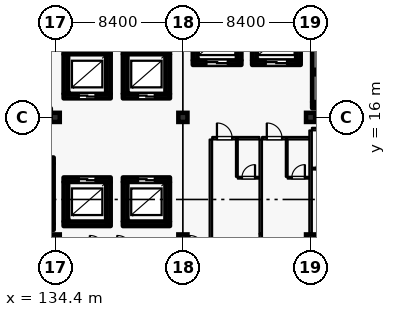
"""IFC4 building model, lengths in metres.
Left out: names, types, materials, properties, quantities, classifications, styles, units other than length and angle.
Written with IfcOpenShell. Run it as: python <this file> out.ifc"""

import sys

from ifc_helpers import new_model, si_unit, direction, frame, frame_2d, origin, origin_2d, place, context, subcontext, project, spatial, rectangle, hollow_rectangle, extrude, element, fill, save


model = new_model("IFC4")
c1 = context("Model", 3, precision=1e-05, world=origin(), true_north=direction((0.0, 1.0)))
c2 = subcontext(c1, "Body", "Model", "MODEL_VIEW")
j1 = project(units=[si_unit("LENGTHUNIT", "METRE"), si_unit("PLANEANGLEUNIT", "RADIAN")], contexts=[c1])
p1 = place(None, origin())
s1 = spatial("IfcSite", under=j1, at=p1, CompositionType="ELEMENT")
p2 = place(p1, origin())
s2 = spatial("IfcBuilding", under=s1, at=p2, CompositionType="ELEMENT")
p3 = place(p2, frame((0.0, 0.0, 39.6)))
s3 = spatial("IfcBuildingStorey", under=s2, at=p3, CompositionType="ELEMENT", Elevation=39.6)
for number, where, z_axis, x_axis in (
    (1, (134.4, 16.0, 0.0), (0.0, 0.0, 1.0), (1.0, 0.0, 0.0)),
    (2, (142.8, 16.0, 0.0), (0.0, 0.0, 1.0), (1.0, 0.0, 0.0)),
    (3, (151.2, 8.0, 0.0), (0.0, 0.0, 1.0), (1.0, 0.0, 0.0)),
    (4, (134.4, 8.0, 0.0), (0.0, 0.0, 1.0), (1.0, 0.0, 0.0)),
    (5, (142.8, 8.0, 0.0), (0.0, 0.0, 1.0), (1.0, 0.0, 0.0)),
    (6, (151.2, 16.0, 0.0), (0.0, 0.0, 1.0), (1.0, 0.0, 0.0)),
):
    element("IfcColumn", number, at=place(p3, frame(where, z_axis=z_axis, x_axis=x_axis)), inside=s3, PredefinedType="COLUMN", context=c2, shape_type="SweptSolid", body=[
        extrude(rectangle(XDim=0.6, YDim=0.6, at=origin_2d()), origin(), (0.0, 0.0, 1.0), 3.6),
    ])
p4 = place(p3, frame((134.95, 17.4, 0.0), z_axis=(0.0, 0.0, 1.0), x_axis=(1.0, 0.0, 0.0)))
e7 = element("IfcWall", 7, at=p4, inside=s3, PredefinedType="SHEAR", context=c2, shape_type="SweptSolid", body=[
    extrude(rectangle(XDim=3.1, YDim=0.3, at=frame_2d((1.55, 0.0))), origin(), (0.0, 0.0, 1.0), 3.335),
])
p5 = place(p4, frame((1.0, 0.0, 0.0)))
e8 = element("IfcOpeningElement", 8, at=p5, cuts=e7, PredefinedType="OPENING", context=c2, shape_type="SweptSolid", body=[
    extrude(rectangle(XDim=1.1, YDim=2.2, at=frame_2d((0.55, 1.1))), frame((0.0, 0.16, 0.0), z_axis=(0.0, -1.0, 0.0), x_axis=(1.0, 0.0, 0.0)), (0.0, 0.0, 1.0), 0.32),
])
p6 = place(p3, frame((137.9, 17.555, 0.0), z_axis=(0.0, 0.0, 1.0), x_axis=(0.0, 1.0, 0.0)))
e9 = element("IfcWall", 9, at=p6, inside=s3, PredefinedType="SHEAR", context=c2, shape_type="SweptSolid", body=[
    extrude(rectangle(XDim=2.59, YDim=0.3, at=frame_2d((1.295, 0.0))), origin(), (0.0, 0.0, 1.0), 3.335),
])
p7 = place(p3, frame((138.05, 20.3, 0.0), z_axis=(0.0, 0.0, 1.0), x_axis=(-1.0, 0.0, 0.0)))
e10 = element("IfcWall", 10, at=p7, inside=s3, PredefinedType="SHEAR", context=c2, shape_type="SweptSolid", body=[
    extrude(rectangle(XDim=3.1, YDim=0.3, at=frame_2d((1.55, 0.0))), origin(), (0.0, 0.0, 1.0), 3.335),
])
p8 = place(p3, frame((135.1, 20.145, 0.0), z_axis=(0.0, 0.0, 1.0), x_axis=(0.0, -1.0, 0.0)))
e11 = element("IfcWall", 11, at=p8, inside=s3, PredefinedType="SHEAR", context=c2, shape_type="SweptSolid", body=[
    extrude(rectangle(XDim=2.59, YDim=0.3, at=frame_2d((1.295, 0.0))), origin(), (0.0, 0.0, 1.0), 3.335),
])
p9 = place(p3, frame((138.85, 17.4, 0.0), z_axis=(0.0, 0.0, 1.0), x_axis=(1.0, 0.0, 0.0)))
e12 = element("IfcWall", 12, at=p9, inside=s3, PredefinedType="SHEAR", context=c2, shape_type="SweptSolid", body=[
    extrude(rectangle(XDim=3.1, YDim=0.3, at=frame_2d((1.55, 0.0))), origin(), (0.0, 0.0, 1.0), 3.335),
])
p10 = place(p9, frame((1.0, 0.0, 0.0)))
e13 = element("IfcOpeningElement", 13, at=p10, cuts=e12, PredefinedType="OPENING", context=c2, shape_type="SweptSolid", body=[
    extrude(rectangle(XDim=1.1, YDim=2.2, at=frame_2d((0.55, 1.1))), frame((0.0, 0.16, 0.0), z_axis=(0.0, -1.0, 0.0), x_axis=(1.0, 0.0, 0.0)), (0.0, 0.0, 1.0), 0.32),
])
p11 = place(p3, frame((141.8, 17.555, 0.0), z_axis=(0.0, 0.0, 1.0), x_axis=(0.0, 1.0, 0.0)))
e14 = element("IfcWall", 14, at=p11, inside=s3, PredefinedType="SHEAR", context=c2, shape_type="SweptSolid", body=[
    extrude(rectangle(XDim=2.59, YDim=0.3, at=frame_2d((1.295, 0.0))), origin(), (0.0, 0.0, 1.0), 3.335),
])
p12 = place(p3, frame((141.95, 20.3, 0.0), z_axis=(0.0, 0.0, 1.0), x_axis=(-1.0, 0.0, 0.0)))
e15 = element("IfcWall", 15, at=p12, inside=s3, PredefinedType="SHEAR", context=c2, shape_type="SweptSolid", body=[
    extrude(rectangle(XDim=3.1, YDim=0.3, at=frame_2d((1.55, 0.0))), origin(), (0.0, 0.0, 1.0), 3.335),
])
p13 = place(p3, frame((139.0, 20.145, 0.0), z_axis=(0.0, 0.0, 1.0), x_axis=(0.0, -1.0, 0.0)))
e16 = element("IfcWall", 16, at=p13, inside=s3, PredefinedType="SHEAR", context=c2, shape_type="SweptSolid", body=[
    extrude(rectangle(XDim=2.59, YDim=0.3, at=frame_2d((1.295, 0.0))), origin(), (0.0, 0.0, 1.0), 3.335),
])
p14 = place(p3, frame((134.95, 9.0, 0.0), z_axis=(0.0, 0.0, 1.0), x_axis=(1.0, 0.0, 0.0)))
e17 = element("IfcWall", 17, at=p14, inside=s3, PredefinedType="SHEAR", context=c2, shape_type="SweptSolid", body=[
    extrude(rectangle(XDim=3.1, YDim=0.3, at=frame_2d((1.55, 0.0))), origin(), (0.0, 0.0, 1.0), 3.335),
])
p15 = place(p3, frame((137.9, 9.155, 0.0), z_axis=(0.0, 0.0, 1.0), x_axis=(0.0, 1.0, 0.0)))
e18 = element("IfcWall", 18, at=p15, inside=s3, PredefinedType="SHEAR", context=c2, shape_type="SweptSolid", body=[
    extrude(rectangle(XDim=2.59, YDim=0.3, at=frame_2d((1.295, 0.0))), origin(), (0.0, 0.0, 1.0), 3.335),
])
p16 = place(p3, frame((138.05, 11.9, 0.0), z_axis=(0.0, 0.0, 1.0), x_axis=(-1.0, 0.0, 0.0)))
e19 = element("IfcWall", 19, at=p16, inside=s3, PredefinedType="SHEAR", context=c2, shape_type="SweptSolid", body=[
    extrude(rectangle(XDim=3.1, YDim=0.3, at=frame_2d((1.55, 0.0))), origin(), (0.0, 0.0, 1.0), 3.335),
])
p17 = place(p16, frame((1.0, 0.0, 0.0)))
e20 = element("IfcOpeningElement", 20, at=p17, cuts=e19, PredefinedType="OPENING", context=c2, shape_type="SweptSolid", body=[
    extrude(rectangle(XDim=1.1, YDim=2.2, at=frame_2d((0.55, 1.1))), frame((0.0, 0.16, 0.0), z_axis=(0.0, -1.0, 0.0), x_axis=(1.0, 0.0, 0.0)), (0.0, 0.0, 1.0), 0.32),
])
p18 = place(p3, frame((135.1, 11.745, 0.0), z_axis=(0.0, 0.0, 1.0), x_axis=(0.0, -1.0, 0.0)))
e21 = element("IfcWall", 21, at=p18, inside=s3, PredefinedType="SHEAR", context=c2, shape_type="SweptSolid", body=[
    extrude(rectangle(XDim=2.59, YDim=0.3, at=frame_2d((1.295, 0.0))), origin(), (0.0, 0.0, 1.0), 3.335),
])
p19 = place(p3, frame((138.85, 9.0, 0.0), z_axis=(0.0, 0.0, 1.0), x_axis=(1.0, 0.0, 0.0)))
e22 = element("IfcWall", 22, at=p19, inside=s3, PredefinedType="SHEAR", context=c2, shape_type="SweptSolid", body=[
    extrude(rectangle(XDim=3.1, YDim=0.3, at=frame_2d((1.55, 0.0))), origin(), (0.0, 0.0, 1.0), 3.335),
])
p20 = place(p3, frame((141.8, 9.155, 0.0), z_axis=(0.0, 0.0, 1.0), x_axis=(0.0, 1.0, 0.0)))
e23 = element("IfcWall", 23, at=p20, inside=s3, PredefinedType="SHEAR", context=c2, shape_type="SweptSolid", body=[
    extrude(rectangle(XDim=2.59, YDim=0.3, at=frame_2d((1.295, 0.0))), origin(), (0.0, 0.0, 1.0), 3.335),
])
p21 = place(p3, frame((141.95, 11.9, 0.0), z_axis=(0.0, 0.0, 1.0), x_axis=(-1.0, 0.0, 0.0)))
e24 = element("IfcWall", 24, at=p21, inside=s3, PredefinedType="SHEAR", context=c2, shape_type="SweptSolid", body=[
    extrude(rectangle(XDim=3.1, YDim=0.3, at=frame_2d((1.55, 0.0))), origin(), (0.0, 0.0, 1.0), 3.335),
])
p22 = place(p21, frame((1.0, 0.0, 0.0)))
e25 = element("IfcOpeningElement", 25, at=p22, cuts=e24, PredefinedType="OPENING", context=c2, shape_type="SweptSolid", body=[
    extrude(rectangle(XDim=1.1, YDim=2.2, at=frame_2d((0.55, 1.1))), frame((0.0, 0.16, 0.0), z_axis=(0.0, -1.0, 0.0), x_axis=(1.0, 0.0, 0.0)), (0.0, 0.0, 1.0), 0.32),
])
p23 = place(p3, frame((139.0, 11.745, 0.0), z_axis=(0.0, 0.0, 1.0), x_axis=(0.0, -1.0, 0.0)))
e26 = element("IfcWall", 26, at=p23, inside=s3, PredefinedType="SHEAR", context=c2, shape_type="SweptSolid", body=[
    extrude(rectangle(XDim=2.59, YDim=0.3, at=frame_2d((1.295, 0.0))), origin(), (0.0, 0.0, 1.0), 3.335),
])
p24 = place(p3, frame((143.45, 19.6, 0.0), z_axis=(0.0, 0.0, 1.0), x_axis=(1.0, 0.0, 0.0)))
e27 = element("IfcWall", 27, at=p24, inside=s3, PredefinedType="SHEAR", context=c2, shape_type="SweptSolid", body=[
    extrude(rectangle(XDim=3.2, YDim=0.3, at=frame_2d((1.6, 0.0))), origin(), (0.0, 0.0, 1.0), 3.335),
])
p25 = place(p24, frame((0.9, 0.0, 0.0)))
e28 = element("IfcOpeningElement", 28, at=p25, cuts=e27, PredefinedType="OPENING", context=c2, shape_type="SweptSolid", body=[
    extrude(rectangle(XDim=1.4, YDim=2.35, at=frame_2d((0.7, 1.175))), frame((0.0, 0.16, 0.0), z_axis=(0.0, -1.0, 0.0), x_axis=(1.0, 0.0, 0.0)), (0.0, 0.0, 1.0), 0.32),
])
for number, where, z_axis, x_axis in (
    (29, (146.5, 19.755, 0.0), (0.0, 0.0, 1.0), (0.0, 1.0, 0.0)),
    (30, (143.6, 22.445, 0.0), (0.0, 0.0, 1.0), (0.0, -1.0, 0.0)),
):
    element("IfcWall", number, at=place(p3, frame(where, z_axis=z_axis, x_axis=x_axis)), inside=s3, PredefinedType="SHEAR", context=c2, shape_type="SweptSolid", body=[
        extrude(rectangle(XDim=2.69, YDim=0.3, at=frame_2d((1.345, 0.0))), origin(), (0.0, 0.0, 1.0), 3.335),
    ])
p26 = place(p3, frame((147.35, 19.6, 0.0), z_axis=(0.0, 0.0, 1.0), x_axis=(1.0, 0.0, 0.0)))
e31 = element("IfcWall", 31, at=p26, inside=s3, PredefinedType="SHEAR", context=c2, shape_type="SweptSolid", body=[
    extrude(rectangle(XDim=3.2, YDim=0.3, at=frame_2d((1.6, 0.0))), origin(), (0.0, 0.0, 1.0), 3.335),
])
p27 = place(p26, frame((0.9, 0.0, 0.0)))
e32 = element("IfcOpeningElement", 32, at=p27, cuts=e31, PredefinedType="OPENING", context=c2, shape_type="SweptSolid", body=[
    extrude(rectangle(XDim=1.4, YDim=2.35, at=frame_2d((0.7, 1.175))), frame((0.0, 0.16, 0.0), z_axis=(0.0, -1.0, 0.0), x_axis=(1.0, 0.0, 0.0)), (0.0, 0.0, 1.0), 0.32),
])
for number, where, z_axis, x_axis in (
    (33, (150.4, 19.755, 0.0), (0.0, 0.0, 1.0), (0.0, 1.0, 0.0)),
    (34, (147.5, 22.445, 0.0), (0.0, 0.0, 1.0), (0.0, -1.0, 0.0)),
):
    element("IfcWall", number, at=place(p3, frame(where, z_axis=z_axis, x_axis=x_axis)), inside=s3, PredefinedType="SHEAR", context=c2, shape_type="SweptSolid", body=[
        extrude(rectangle(XDim=2.69, YDim=0.3, at=frame_2d((1.345, 0.0))), origin(), (0.0, 0.0, 1.0), 3.335),
    ])
p28 = place(p3, frame((126.1, 8.8, 0.0), z_axis=(0.0, 0.0, 1.0), x_axis=(1.0, 0.0, 0.0)))
e35 = element("IfcWall", 35, at=p28, inside=s3, PredefinedType="SHEAR", context=c2, shape_type="SweptSolid", body=[
    extrude(rectangle(XDim=8.2, YDim=0.4, at=frame_2d((4.1, 0.0))), origin(), (0.0, 0.0, 1.0), 3.335),
])
p29 = place(p3, frame((134.1, 9.005, 0.0), z_axis=(0.0, 0.0, 1.0), x_axis=(0.0, 1.0, 0.0)))
e36 = element("IfcWall", 36, at=p29, inside=s3, PredefinedType="SHEAR", context=c2, shape_type="SweptSolid", body=[
    extrude(rectangle(XDim=3.95, YDim=0.4, at=frame_2d((1.975, 0.0))), origin(), (0.0, 0.0, 1.0), 3.335),
])
p30 = place(p3, frame((126.1, 13.16, 0.0), z_axis=(0.0, 0.0, 1.0), x_axis=(1.0, 0.0, 0.0)))
e37 = element("IfcWall", 37, at=p30, inside=s3, PredefinedType="SHEAR", context=c2, shape_type="SweptSolid", body=[
    extrude(rectangle(XDim=8.2, YDim=0.4, at=frame_2d((4.1, 0.0))), origin(), (0.0, 0.0, 1.0), 3.335),
])
p31 = place(p30, frame((0.43, 0.0, 0.0)))
e38 = element("IfcOpeningElement", 38, at=p31, cuts=e37, PredefinedType="OPENING", context=c2, shape_type="SweptSolid", body=[
    extrude(rectangle(XDim=1.16, YDim=2.2, at=frame_2d((0.58, 1.1))), frame((0.0, 0.21, 0.0), z_axis=(0.0, -1.0, 0.0), x_axis=(1.0, 0.0, 0.0)), (0.0, 0.0, 1.0), 0.42),
])
p32 = place(p3, frame((151.3, 16.8, 0.0), z_axis=(0.0, 0.0, 1.0), x_axis=(1.0, 0.0, 0.0)))
e39 = element("IfcWall", 39, at=p32, inside=s3, PredefinedType="SHEAR", context=c2, shape_type="SweptSolid", body=[
    extrude(rectangle(XDim=8.2, YDim=0.4, at=frame_2d((4.1, 0.0))), origin(), (0.0, 0.0, 1.0), 3.335),
])
p33 = place(p3, frame((151.5, 17.005, 0.0), z_axis=(0.0, 0.0, 1.0), x_axis=(0.0, 1.0, 0.0)))
e40 = element("IfcWall", 40, at=p33, inside=s3, PredefinedType="SHEAR", context=c2, shape_type="SweptSolid", body=[
    extrude(rectangle(XDim=3.95, YDim=0.4, at=frame_2d((1.975, 0.0))), origin(), (0.0, 0.0, 1.0), 3.335),
])
for number, where, z_axis, x_axis in (
    (41, (151.68, 16.8, 0.0), (0.0, 0.0, 1.0), (1.0, 0.0, 0.0)),
    (42, (151.68, 18.98, 0.0), (0.0, 0.0, 1.0), (1.0, 0.0, 0.0)),
):
    element("IfcColumn", number, at=place(p3, frame(where, z_axis=z_axis, x_axis=x_axis)), inside=s3, PredefinedType="COLUMN", context=c2, shape_type="SweptSolid", body=[
        extrude(hollow_rectangle(XDim=0.3, YDim=0.3, WallThickness=0.012, at=origin_2d()), origin(), (0.0, 0.0, 1.0), 3.42),
    ])
p34 = place(p3, frame((144.73, 14.63, 0.0), z_axis=(0.0, 0.0, 1.0), x_axis=(1.0, 0.0, 0.0)))
e43 = element("IfcWall", 43, at=p34, inside=s3, PredefinedType="PARTITIONING", context=c2, shape_type="SweptSolid", body=[
    extrude(rectangle(XDim=1.62, YDim=0.16, at=frame_2d((0.81, 0.0))), origin(), (0.0, 0.0, 1.0), 3.335),
])
p35 = place(p34, frame((0.31, 0.0, 0.0)))
e44 = element("IfcOpeningElement", 44, at=p35, cuts=e43, PredefinedType="OPENING", context=c2, shape_type="SweptSolid", body=[
    extrude(rectangle(XDim=1.0, YDim=2.25, at=frame_2d((0.5, 1.125))), frame((0.0, 0.09, 0.0), z_axis=(0.0, -1.0, 0.0), x_axis=(1.0, 0.0, 0.0)), (0.0, 0.0, 1.0), 0.18),
])
p36 = place(p3, frame((146.36, 14.63, 0.0), z_axis=(0.0, 0.0, 1.0), x_axis=(1.0, 0.0, 0.0)))
e45 = element("IfcWall", 45, at=p36, inside=s3, PredefinedType="PARTITIONING", context=c2, shape_type="SweptSolid", body=[
    extrude(rectangle(XDim=1.47, YDim=0.16, at=frame_2d((0.735, 0.0))), origin(), (0.0, 0.0, 1.0), 3.335),
])
p37 = place(p3, frame((146.35, 12.09, 0.0), z_axis=(0.0, 0.0, 1.0), x_axis=(0.0, 1.0, 0.0)))
e46 = element("IfcWall", 46, at=p37, inside=s3, PredefinedType="PARTITIONING", context=c2, shape_type="SweptSolid", body=[
    extrude(rectangle(XDim=2.45, YDim=0.115, at=frame_2d((1.225, 0.0))), origin(), (0.0, 0.0, 1.0), 3.335),
])
p38 = place(p3, frame((146.41, 12.03, 0.0), z_axis=(0.0, 0.0, 1.0), x_axis=(1.0, 0.0, 0.0)))
e47 = element("IfcWall", 47, at=p38, inside=s3, PredefinedType="PARTITIONING", context=c2, shape_type="SweptSolid", body=[
    extrude(rectangle(XDim=1.41, YDim=0.115, at=frame_2d((0.705, 0.0))), origin(), (0.0, 0.0, 1.0), 3.335),
])
p39 = place(p38, frame((0.275, 0.0, 0.0)))
e48 = element("IfcOpeningElement", 48, at=p39, cuts=e47, PredefinedType="OPENING", context=c2, shape_type="SweptSolid", body=[
    extrude(rectangle(XDim=0.86, YDim=2.12, at=frame_2d((0.43, 1.06))), frame((0.0, 0.067, 0.0), z_axis=(0.0, -1.0, 0.0), x_axis=(1.0, 0.0, 0.0)), (0.0, 0.0, 1.0), 0.135),
])
p40 = place(p3, frame((144.64, 5.22, 0.0), z_axis=(0.0, 0.0, 1.0), x_axis=(0.0, 1.0, 0.0)))
e49 = element("IfcWall", 49, at=p40, inside=s3, PredefinedType="PARTITIONING", context=c2, shape_type="SweptSolid", body=[
    extrude(rectangle(XDim=9.32, YDim=0.16, at=frame_2d((4.66, 0.0))), origin(), (0.0, 0.0, 1.0), 3.335),
])
p41 = place(p3, frame((147.92, 5.22, 0.0), z_axis=(0.0, 0.0, 1.0), x_axis=(0.0, 1.0, 0.0)))
e50 = element("IfcWall", 50, at=p41, inside=s3, PredefinedType="PARTITIONING", context=c2, shape_type="SweptSolid", body=[
    extrude(rectangle(XDim=3.11, YDim=0.16, at=frame_2d((1.555, 0.0))), origin(), (0.0, 0.0, 1.0), 3.335),
])
p42 = place(p3, frame((148.01, 14.63, 0.0), z_axis=(0.0, 0.0, 1.0), x_axis=(1.0, 0.0, 0.0)))
e51 = element("IfcWall", 51, at=p42, inside=s3, PredefinedType="PARTITIONING", context=c2, shape_type="SweptSolid", body=[
    extrude(rectangle(XDim=1.62, YDim=0.16, at=frame_2d((0.81, 0.0))), origin(), (0.0, 0.0, 1.0), 3.335),
])
p43 = place(p42, frame((0.31, 0.0, 0.0)))
e52 = element("IfcOpeningElement", 52, at=p43, cuts=e51, PredefinedType="OPENING", context=c2, shape_type="SweptSolid", body=[
    extrude(rectangle(XDim=1.0, YDim=2.25, at=frame_2d((0.5, 1.125))), frame((0.0, 0.09, 0.0), z_axis=(0.0, -1.0, 0.0), x_axis=(1.0, 0.0, 0.0)), (0.0, 0.0, 1.0), 0.18),
])
p44 = place(p3, frame((149.64, 14.63, 0.0), z_axis=(0.0, 0.0, 1.0), x_axis=(1.0, 0.0, 0.0)))
e53 = element("IfcWall", 53, at=p44, inside=s3, PredefinedType="PARTITIONING", context=c2, shape_type="SweptSolid", body=[
    extrude(rectangle(XDim=1.47, YDim=0.16, at=frame_2d((0.735, 0.0))), origin(), (0.0, 0.0, 1.0), 3.335),
])
p45 = place(p3, frame((149.63, 12.09, 0.0), z_axis=(0.0, 0.0, 1.0), x_axis=(0.0, 1.0, 0.0)))
e54 = element("IfcWall", 54, at=p45, inside=s3, PredefinedType="PARTITIONING", context=c2, shape_type="SweptSolid", body=[
    extrude(rectangle(XDim=2.45, YDim=0.115, at=frame_2d((1.225, 0.0))), origin(), (0.0, 0.0, 1.0), 3.335),
])
p46 = place(p3, frame((149.69, 12.03, 0.0), z_axis=(0.0, 0.0, 1.0), x_axis=(1.0, 0.0, 0.0)))
e55 = element("IfcWall", 55, at=p46, inside=s3, PredefinedType="PARTITIONING", context=c2, shape_type="SweptSolid", body=[
    extrude(rectangle(XDim=1.41, YDim=0.115, at=frame_2d((0.705, 0.0))), origin(), (0.0, 0.0, 1.0), 3.335),
])
p47 = place(p46, frame((0.275, 0.0, 0.0)))
e56 = element("IfcOpeningElement", 56, at=p47, cuts=e55, PredefinedType="OPENING", context=c2, shape_type="SweptSolid", body=[
    extrude(rectangle(XDim=0.86, YDim=2.12, at=frame_2d((0.43, 1.06))), frame((0.0, 0.067, 0.0), z_axis=(0.0, -1.0, 0.0), x_axis=(1.0, 0.0, 0.0)), (0.0, 0.0, 1.0), 0.135),
])
p48 = place(p3, frame((147.92, 8.34, 0.0), z_axis=(0.0, 0.0, 1.0), x_axis=(0.0, 1.0, 0.0)))
e57 = element("IfcWall", 57, at=p48, inside=s3, PredefinedType="PARTITIONING", context=c2, shape_type="SweptSolid", body=[
    extrude(rectangle(XDim=6.2, YDim=0.16, at=frame_2d((3.1, 0.0))), origin(), (0.0, 0.0, 1.0), 3.335),
])
p49 = place(p3, frame((151.29, 15.23, 0.0), z_axis=(0.0, 0.0, 1.0), x_axis=(1.0, 0.0, 0.0)))
e58 = element("IfcWall", 58, at=p49, inside=s3, PredefinedType="PARTITIONING", context=c2, shape_type="SweptSolid", body=[
    extrude(rectangle(XDim=1.45, YDim=0.16, at=frame_2d((0.725, 0.0))), origin(), (0.0, 0.0, 1.0), 3.335),
])
p50 = place(p3, frame((151.3, 12.63, 0.0), z_axis=(0.0, 0.0, 1.0), x_axis=(1.0, 0.0, 0.0)))
e59 = element("IfcWall", 59, at=p50, inside=s3, PredefinedType="PARTITIONING", context=c2, shape_type="SweptSolid", body=[
    extrude(rectangle(XDim=1.39, YDim=0.115, at=frame_2d((0.695, 0.0))), origin(), (0.0, 0.0, 1.0), 3.335),
])
p51 = place(p50, frame((0.265, 0.0, 0.0)))
e60 = element("IfcOpeningElement", 60, at=p51, cuts=e59, PredefinedType="OPENING", context=c2, shape_type="SweptSolid", body=[
    extrude(rectangle(XDim=0.86, YDim=2.12, at=frame_2d((0.43, 1.06))), frame((0.0, 0.067, 0.0), z_axis=(0.0, -1.0, 0.0), x_axis=(1.0, 0.0, 0.0)), (0.0, 0.0, 1.0), 0.135),
])
p52 = place(p3, frame((151.2, 8.34, 0.0), z_axis=(0.0, 0.0, 1.0), x_axis=(0.0, 1.0, 0.0)))
e61 = element("IfcWall", 61, at=p52, inside=s3, PredefinedType="PARTITIONING", context=c2, shape_type="SweptSolid", body=[
    extrude(rectangle(XDim=6.8, YDim=0.16, at=frame_2d((3.4, 0.0))), origin(), (0.0, 0.0, 1.0), 2.74),
])
p53 = place(p5, origin())
e62 = element("IfcDoor", 62, at=p53, inside=s3, OperationType="DOUBLE_DOOR_SLIDING", PredefinedType="DOOR", context=c2, shape_type="SweptSolid", body=[
    extrude(rectangle(XDim=1.1, YDim=2.2, at=frame_2d((0.55, 1.1))), frame((0.0, 0.025, 0.0), z_axis=(0.0, -1.0, 0.0), x_axis=(1.0, 0.0, 0.0)), (0.0, 0.0, 1.0), 0.05),
])
fill(e8, e62)
p54 = place(p10, origin())
e63 = element("IfcDoor", 63, at=p54, inside=s3, OperationType="DOUBLE_DOOR_SLIDING", PredefinedType="DOOR", context=c2, shape_type="SweptSolid", body=[
    extrude(rectangle(XDim=1.1, YDim=2.2, at=frame_2d((0.55, 1.1))), frame((0.0, 0.025, 0.0), z_axis=(0.0, -1.0, 0.0), x_axis=(1.0, 0.0, 0.0)), (0.0, 0.0, 1.0), 0.05),
])
fill(e13, e63)
p55 = place(p17, origin())
e64 = element("IfcDoor", 64, at=p55, inside=s3, OperationType="DOUBLE_DOOR_SLIDING", PredefinedType="DOOR", context=c2, shape_type="SweptSolid", body=[
    extrude(rectangle(XDim=1.1, YDim=2.2, at=frame_2d((0.55, 1.1))), frame((0.0, 0.025, 0.0), z_axis=(0.0, -1.0, 0.0), x_axis=(1.0, 0.0, 0.0)), (0.0, 0.0, 1.0), 0.05),
])
fill(e20, e64)
p56 = place(p22, origin())
e65 = element("IfcDoor", 65, at=p56, inside=s3, OperationType="DOUBLE_DOOR_SLIDING", PredefinedType="DOOR", context=c2, shape_type="SweptSolid", body=[
    extrude(rectangle(XDim=1.1, YDim=2.2, at=frame_2d((0.55, 1.1))), frame((0.0, 0.025, 0.0), z_axis=(0.0, -1.0, 0.0), x_axis=(1.0, 0.0, 0.0)), (0.0, 0.0, 1.0), 0.05),
])
fill(e25, e65)
p57 = place(p25, origin())
e66 = element("IfcDoor", 66, at=p57, inside=s3, OperationType="DOUBLE_DOOR_SLIDING", PredefinedType="DOOR", context=c2, shape_type="SweptSolid", body=[
    extrude(rectangle(XDim=1.4, YDim=2.35, at=frame_2d((0.7, 1.175))), frame((0.0, 0.025, 0.0), z_axis=(0.0, -1.0, 0.0), x_axis=(1.0, 0.0, 0.0)), (0.0, 0.0, 1.0), 0.05),
])
fill(e28, e66)
p58 = place(p27, origin())
e67 = element("IfcDoor", 67, at=p58, inside=s3, OperationType="DOUBLE_DOOR_SLIDING", PredefinedType="DOOR", context=c2, shape_type="SweptSolid", body=[
    extrude(rectangle(XDim=1.4, YDim=2.35, at=frame_2d((0.7, 1.175))), frame((0.0, 0.025, 0.0), z_axis=(0.0, -1.0, 0.0), x_axis=(1.0, 0.0, 0.0)), (0.0, 0.0, 1.0), 0.05),
])
fill(e32, e67)
p59 = place(p35, origin())
e68 = element("IfcDoor", 68, at=p59, inside=s3, OperationType="SINGLE_SWING_LEFT", PredefinedType="DOOR", context=c2, shape_type="SweptSolid", body=[
    extrude(rectangle(XDim=1.0, YDim=2.25, at=frame_2d((0.5, 1.125))), frame((0.0, 0.025, 0.0), z_axis=(0.0, -1.0, 0.0), x_axis=(1.0, 0.0, 0.0)), (0.0, 0.0, 1.0), 0.05),
])
fill(e44, e68)
p60 = place(p39, origin())
e69 = element("IfcDoor", 69, at=p60, inside=s3, OperationType="SINGLE_SWING_RIGHT", PredefinedType="DOOR", context=c2, shape_type="SweptSolid", body=[
    extrude(rectangle(XDim=0.86, YDim=2.12, at=frame_2d((0.43, 1.06))), frame((0.0, 0.025, 0.0), z_axis=(0.0, -1.0, 0.0), x_axis=(1.0, 0.0, 0.0)), (0.0, 0.0, 1.0), 0.05),
])
fill(e48, e69)
p61 = place(p43, origin())
e70 = element("IfcDoor", 70, at=p61, inside=s3, OperationType="SINGLE_SWING_LEFT", PredefinedType="DOOR", context=c2, shape_type="SweptSolid", body=[
    extrude(rectangle(XDim=1.0, YDim=2.25, at=frame_2d((0.5, 1.125))), frame((0.0, 0.025, 0.0), z_axis=(0.0, -1.0, 0.0), x_axis=(1.0, 0.0, 0.0)), (0.0, 0.0, 1.0), 0.05),
])
fill(e52, e70)
p62 = place(p47, origin())
e71 = element("IfcDoor", 71, at=p62, inside=s3, OperationType="SINGLE_SWING_RIGHT", PredefinedType="DOOR", context=c2, shape_type="SweptSolid", body=[
    extrude(rectangle(XDim=0.86, YDim=2.12, at=frame_2d((0.43, 1.06))), frame((0.0, 0.025, 0.0), z_axis=(0.0, -1.0, 0.0), x_axis=(1.0, 0.0, 0.0)), (0.0, 0.0, 1.0), 0.05),
])
fill(e56, e71)
p63 = place(p51, origin())
e72 = element("IfcDoor", 72, at=p63, inside=s3, OperationType="SINGLE_SWING_RIGHT", PredefinedType="DOOR", context=c2, shape_type="SweptSolid", body=[
    extrude(rectangle(XDim=0.86, YDim=2.12, at=frame_2d((0.43, 1.06))), frame((0.0, 0.025, 0.0), z_axis=(0.0, -1.0, 0.0), x_axis=(1.0, 0.0, 0.0)), (0.0, 0.0, 1.0), 0.05),
])
fill(e60, e72)
save(model, sys.argv[1])
